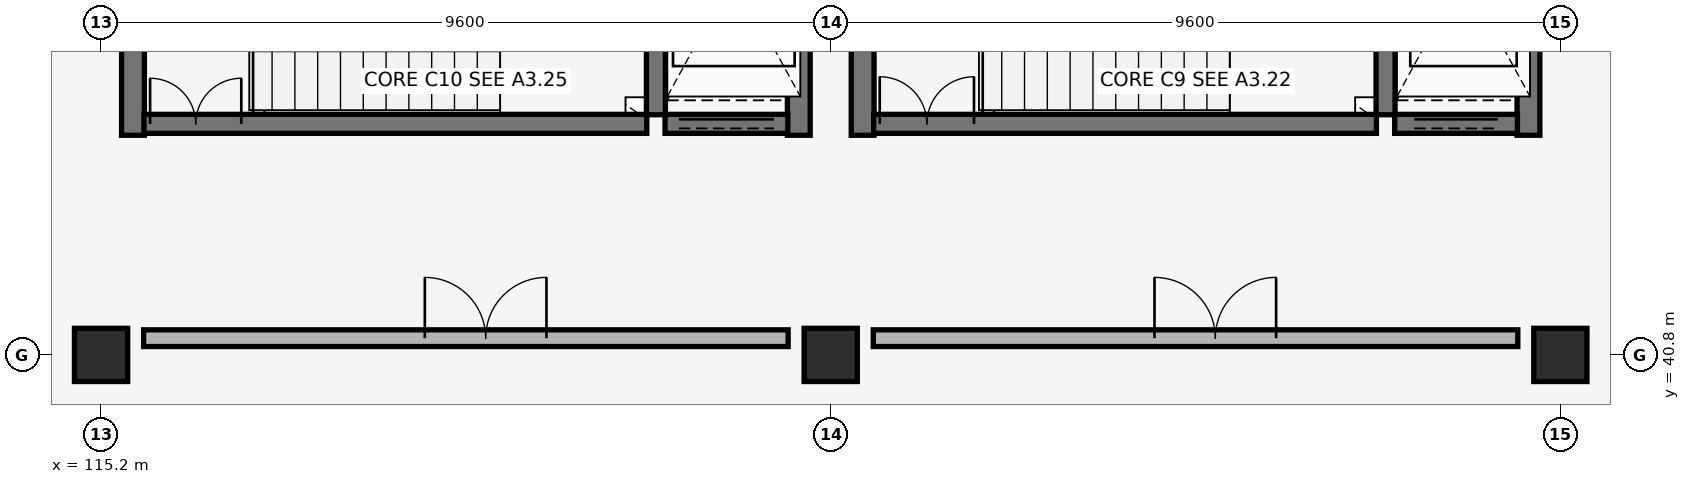
"""IFC4 building model, lengths in metres.
Left out: names, types, materials, properties, quantities, classifications, styles, units other than length and angle.
Written with IfcOpenShell. Run it as: python <this file> out.ifc"""

import sys

from ifc_helpers import new_model, si_unit, direction, frame, frame_2d, origin, origin_2d, place, context, subcontext, project, spatial, rectangle, extrude, element, fill, save


model = new_model("IFC4")
c1 = context("Model", 3, precision=1e-05, world=origin(), true_north=direction((0.0, 1.0)))
c2 = subcontext(c1, "Body", "Model", "MODEL_VIEW")
j1 = project(units=[si_unit("LENGTHUNIT", "METRE"), si_unit("PLANEANGLEUNIT", "RADIAN")], contexts=[c1])
p1 = place(None, origin())
s1 = spatial("IfcSite", under=j1, at=p1, CompositionType="ELEMENT")
p2 = place(p1, origin())
s2 = spatial("IfcBuilding", under=s1, at=p2, CompositionType="ELEMENT")
p3 = place(p2, frame((0.0, 0.0, 4.42)))
s3 = spatial("IfcBuildingStorey", under=s2, at=p3, CompositionType="ELEMENT", Elevation=4.42)
for number, where, z_axis, x_axis in (
    (1, (115.2, 40.8, 0.0), (0.0, 0.0, 1.0), (1.0, 0.0, 0.0)),
    (2, (124.8, 40.8, 0.0), (0.0, 0.0, 1.0), (1.0, 0.0, 0.0)),
    (3, (134.4, 40.8, 0.0), (0.0, 0.0, 1.0), (1.0, 0.0, 0.0)),
):
    element("IfcColumn", number, at=place(p3, frame(where, z_axis=z_axis, x_axis=x_axis)), inside=s3, PredefinedType="COLUMN", context=c2, shape_type="SweptSolid", body=[
        extrude(rectangle(XDim=0.7, YDim=0.7, at=origin_2d()), origin(), (0.0, 0.0, 1.0), 4.08),
    ])
for number, where, z_axis, x_axis in (
    (4, (125.22, 43.69, 0.0), (0.0, 0.0, 1.0), (0.0, 1.0, 0.0)),
    (5, (133.98, 43.69, 0.0), (0.0, 0.0, 1.0), (0.0, 1.0, 0.0)),
):
    element("IfcWall", number, at=place(p3, frame(where, z_axis=z_axis, x_axis=x_axis)), inside=s3, PredefinedType="SHEAR", context=c2, shape_type="SweptSolid", body=[
        extrude(rectangle(XDim=4.1, YDim=0.3, at=frame_2d((2.05, 0.0))), origin(), (0.0, 0.0, 1.0), 3.78),
    ])
p4 = place(p3, frame((132.1, 43.96, 0.0), z_axis=(0.0, 0.0, 1.0), x_axis=(0.0, 1.0, 0.0)))
e6 = element("IfcWall", 6, at=p4, inside=s3, PredefinedType="SHEAR", context=c2, shape_type="SweptSolid", body=[
    extrude(rectangle(XDim=3.53, YDim=0.25, at=frame_2d((1.765, 0.0))), origin(), (0.0, 0.0, 1.0), 3.78),
])
p5 = place(p3, frame((125.365, 43.84, 0.0), z_axis=(0.0, 0.0, 1.0), x_axis=(1.0, 0.0, 0.0)))
e7 = element("IfcWall", 7, at=p5, inside=s3, PredefinedType="SHEAR", context=c2, shape_type="SweptSolid", body=[
    extrude(rectangle(XDim=6.615, YDim=0.25, at=frame_2d((3.308, 0.0))), origin(), (0.0, 0.0, 1.0), 3.78),
])
p6 = place(p5, frame((0.08, 0.0, 0.0)))
e8 = element("IfcOpeningElement", 8, at=p6, cuts=e7, PredefinedType="OPENING", context=c2, shape_type="SweptSolid", body=[
    extrude(rectangle(XDim=1.24, YDim=2.15, at=frame_2d((0.62, 1.075))), frame((0.0, 0.135, 0.0), z_axis=(0.0, -1.0, 0.0), x_axis=(1.0, 0.0, 0.0)), (0.0, 0.0, 1.0), 0.27),
])
p7 = place(p3, frame((125.36, 41.02, 0.0), z_axis=(0.0, 0.0, 1.0), x_axis=(1.0, 0.0, 0.0)))
e9 = element("IfcWall", 9, at=p7, inside=s3, PredefinedType="PARTITIONING", context=c2, shape_type="SweptSolid", body=[
    extrude(rectangle(XDim=8.48, YDim=0.22, at=frame_2d((4.24, 0.0))), origin(), (0.0, 0.0, 1.0), 3.06),
])
p8 = place(p7, frame((3.7, 0.0, 0.0)))
e10 = element("IfcOpeningElement", 10, at=p8, cuts=e9, PredefinedType="OPENING", context=c2, shape_type="SweptSolid", body=[
    extrude(rectangle(XDim=1.6, YDim=2.2, at=frame_2d((0.8, 1.1))), frame((0.0, 0.12, 0.0), z_axis=(0.0, -1.0, 0.0), x_axis=(1.0, 0.0, 0.0)), (0.0, 0.0, 1.0), 0.24),
])
p9 = place(p3, frame((132.22, 43.84, 0.0), z_axis=(0.0, 0.0, 1.0), x_axis=(1.0, 0.0, 0.0)))
e11 = element("IfcWall", 11, at=p9, inside=s3, PredefinedType="SHEAR", context=c2, shape_type="SweptSolid", body=[
    extrude(rectangle(XDim=1.615, YDim=0.25, at=frame_2d((0.808, 0.0))), origin(), (0.0, 0.0, 1.0), 3.78),
])
p10 = place(p9, frame((0.258, 0.0, 0.0)))
e12 = element("IfcOpeningElement", 12, at=p10, cuts=e11, PredefinedType="OPENING", context=c2, shape_type="SweptSolid", body=[
    extrude(rectangle(XDim=1.1, YDim=2.15, at=frame_2d((0.55, 1.075))), frame((0.0, 0.135, 0.0), z_axis=(0.0, -1.0, 0.0), x_axis=(1.0, 0.0, 0.0)), (0.0, 0.0, 1.0), 0.27),
])
for number, where, z_axis, x_axis in (
    (13, (115.62, 43.69, 0.0), (0.0, 0.0, 1.0), (0.0, 1.0, 0.0)),
    (14, (124.38, 43.69, 0.0), (0.0, 0.0, 1.0), (0.0, 1.0, 0.0)),
):
    element("IfcWall", number, at=place(p3, frame(where, z_axis=z_axis, x_axis=x_axis)), inside=s3, PredefinedType="SHEAR", context=c2, shape_type="SweptSolid", body=[
        extrude(rectangle(XDim=4.1, YDim=0.3, at=frame_2d((2.05, 0.0))), origin(), (0.0, 0.0, 1.0), 3.78),
    ])
p11 = place(p3, frame((122.5, 43.96, 0.0), z_axis=(0.0, 0.0, 1.0), x_axis=(0.0, 1.0, 0.0)))
e15 = element("IfcWall", 15, at=p11, inside=s3, PredefinedType="SHEAR", context=c2, shape_type="SweptSolid", body=[
    extrude(rectangle(XDim=3.53, YDim=0.25, at=frame_2d((1.765, 0.0))), origin(), (0.0, 0.0, 1.0), 3.78),
])
p12 = place(p3, frame((115.765, 43.84, 0.0), z_axis=(0.0, 0.0, 1.0), x_axis=(1.0, 0.0, 0.0)))
e16 = element("IfcWall", 16, at=p12, inside=s3, PredefinedType="SHEAR", context=c2, shape_type="SweptSolid", body=[
    extrude(rectangle(XDim=6.615, YDim=0.25, at=frame_2d((3.308, 0.0))), origin(), (0.0, 0.0, 1.0), 3.78),
])
p13 = place(p12, frame((0.08, 0.0, 0.0)))
e17 = element("IfcOpeningElement", 17, at=p13, cuts=e16, PredefinedType="OPENING", context=c2, shape_type="SweptSolid", body=[
    extrude(rectangle(XDim=1.2, YDim=2.15, at=frame_2d((0.6, 1.075))), frame((0.0, 0.135, 0.0), z_axis=(0.0, -1.0, 0.0), x_axis=(1.0, 0.0, 0.0)), (0.0, 0.0, 1.0), 0.27),
])
p14 = place(p3, frame((115.76, 41.02, 0.0), z_axis=(0.0, 0.0, 1.0), x_axis=(1.0, 0.0, 0.0)))
e18 = element("IfcWall", 18, at=p14, inside=s3, PredefinedType="PARTITIONING", context=c2, shape_type="SweptSolid", body=[
    extrude(rectangle(XDim=8.48, YDim=0.22, at=frame_2d((4.24, 0.0))), origin(), (0.0, 0.0, 1.0), 3.06),
])
p15 = place(p14, frame((3.7, 0.0, 0.0)))
e19 = element("IfcOpeningElement", 19, at=p15, cuts=e18, PredefinedType="OPENING", context=c2, shape_type="SweptSolid", body=[
    extrude(rectangle(XDim=1.6, YDim=2.2, at=frame_2d((0.8, 1.1))), frame((0.0, 0.12, 0.0), z_axis=(0.0, -1.0, 0.0), x_axis=(1.0, 0.0, 0.0)), (0.0, 0.0, 1.0), 0.24),
])
p16 = place(p3, frame((122.62, 43.84, 0.0), z_axis=(0.0, 0.0, 1.0), x_axis=(1.0, 0.0, 0.0)))
e20 = element("IfcWall", 20, at=p16, inside=s3, PredefinedType="SHEAR", context=c2, shape_type="SweptSolid", body=[
    extrude(rectangle(XDim=1.615, YDim=0.25, at=frame_2d((0.808, 0.0))), origin(), (0.0, 0.0, 1.0), 3.78),
])
p17 = place(p16, frame((0.183, 0.0, 0.0)))
e21 = element("IfcOpeningElement", 21, at=p17, cuts=e20, PredefinedType="OPENING", context=c2, shape_type="SweptSolid", body=[
    extrude(rectangle(XDim=1.25, YDim=2.15, at=frame_2d((0.625, 1.075))), frame((0.0, 0.135, 0.0), z_axis=(0.0, -1.0, 0.0), x_axis=(1.0, 0.0, 0.0)), (0.0, 0.0, 1.0), 0.27),
])
p18 = place(p6, origin())
e22 = element("IfcDoor", 22, at=p18, inside=s3, OperationType="DOUBLE_DOOR_SINGLE_SWING", PredefinedType="DOOR", context=c2, shape_type="SweptSolid", body=[
    extrude(rectangle(XDim=1.24, YDim=2.15, at=frame_2d((0.62, 1.075))), frame((0.0, 0.025, 0.0), z_axis=(0.0, -1.0, 0.0), x_axis=(1.0, 0.0, 0.0)), (0.0, 0.0, 1.0), 0.05),
])
fill(e8, e22)
p19 = place(p8, origin())
e23 = element("IfcDoor", 23, at=p19, inside=s3, OperationType="DOUBLE_DOOR_SINGLE_SWING", PredefinedType="DOOR", context=c2, shape_type="SweptSolid", body=[
    extrude(rectangle(XDim=1.6, YDim=2.2, at=frame_2d((0.8, 1.1))), frame((0.0, 0.025, 0.0), z_axis=(0.0, -1.0, 0.0), x_axis=(1.0, 0.0, 0.0)), (0.0, 0.0, 1.0), 0.05),
])
fill(e10, e23)
p20 = place(p10, origin())
e24 = element("IfcDoor", 24, at=p20, inside=s3, OperationType="DOUBLE_DOOR_SLIDING", PredefinedType="DOOR", context=c2, shape_type="SweptSolid", body=[
    extrude(rectangle(XDim=1.1, YDim=2.15, at=frame_2d((0.55, 1.075))), frame((0.0, 0.025, 0.0), z_axis=(0.0, -1.0, 0.0), x_axis=(1.0, 0.0, 0.0)), (0.0, 0.0, 1.0), 0.05),
])
fill(e12, e24)
p21 = place(p13, origin())
e25 = element("IfcDoor", 25, at=p21, inside=s3, OperationType="DOUBLE_DOOR_SINGLE_SWING", PredefinedType="DOOR", context=c2, shape_type="SweptSolid", body=[
    extrude(rectangle(XDim=1.2, YDim=2.15, at=frame_2d((0.6, 1.075))), frame((0.0, 0.025, 0.0), z_axis=(0.0, -1.0, 0.0), x_axis=(1.0, 0.0, 0.0)), (0.0, 0.0, 1.0), 0.05),
])
fill(e17, e25)
p22 = place(p15, origin())
e26 = element("IfcDoor", 26, at=p22, inside=s3, OperationType="DOUBLE_DOOR_SINGLE_SWING", PredefinedType="DOOR", context=c2, shape_type="SweptSolid", body=[
    extrude(rectangle(XDim=1.6, YDim=2.2, at=frame_2d((0.8, 1.1))), frame((0.0, 0.025, 0.0), z_axis=(0.0, -1.0, 0.0), x_axis=(1.0, 0.0, 0.0)), (0.0, 0.0, 1.0), 0.05),
])
fill(e19, e26)
p23 = place(p17, origin())
e27 = element("IfcDoor", 27, at=p23, inside=s3, OperationType="DOUBLE_DOOR_SLIDING", PredefinedType="DOOR", context=c2, shape_type="SweptSolid", body=[
    extrude(rectangle(XDim=1.25, YDim=2.15, at=frame_2d((0.625, 1.075))), frame((0.0, 0.025, 0.0), z_axis=(0.0, -1.0, 0.0), x_axis=(1.0, 0.0, 0.0)), (0.0, 0.0, 1.0), 0.05),
])
fill(e21, e27)
save(model, sys.argv[1])
